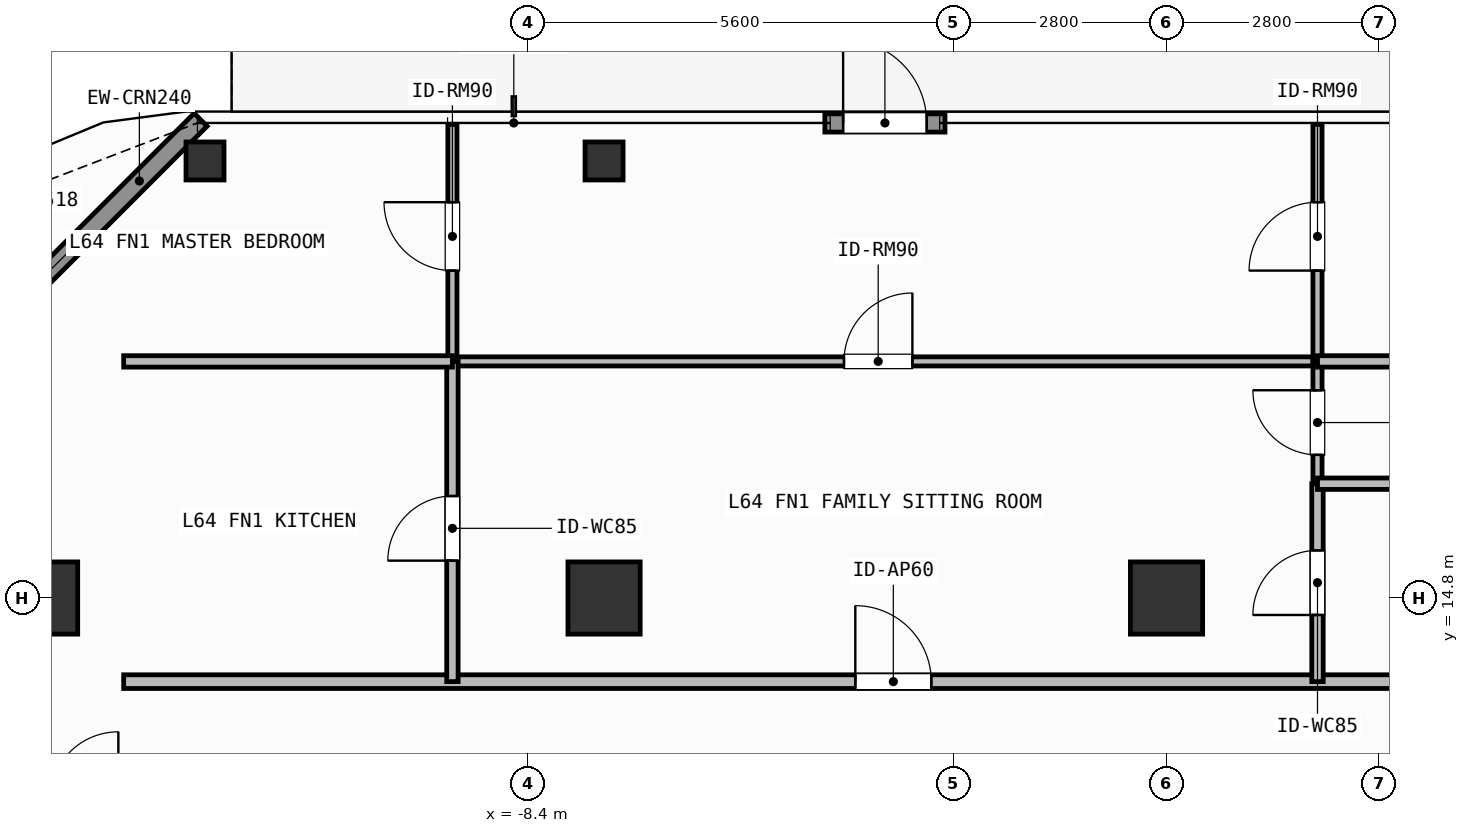
"""IFC4 building model, lengths in metres.
Left out: names, types, materials, properties, quantities, classifications, styles, units other than length and angle.
Written with IfcOpenShell. Run it as: python <this file> out.ifc"""

import sys

from ifc_helpers import new_model, si_unit, direction, frame, frame_2d, origin, origin_2d, place, context, subcontext, project, spatial, rectangle, hollow_rectangle, extrude, element, fill, save


model = new_model("IFC4")
c1 = context("Model", 3, precision=1e-05, world=origin(), true_north=direction((0.0, 1.0)))
c2 = subcontext(c1, "Body", "Model", "MODEL_VIEW")
j1 = project(units=[si_unit("LENGTHUNIT", "METRE"), si_unit("PLANEANGLEUNIT", "RADIAN")], contexts=[c1])
p1 = place(None, origin())
s1 = spatial("IfcSite", under=j1, at=p1, CompositionType="ELEMENT")
p2 = place(p1, origin())
s2 = spatial("IfcBuilding", under=s1, at=p2, CompositionType="ELEMENT")
p3 = place(p2, frame((0.0, 0.0, 262.5)))
s3 = spatial("IfcBuildingStorey", under=s2, at=p3, CompositionType="ELEMENT", Elevation=262.5)
for number, where, z_axis, x_axis in (
    (1, (-14.8, 14.8, 0.0), (0.0, 0.0, 1.0), (1.0, 0.0, 0.0)),
    (2, (-7.4, 14.8, 0.0), (0.0, 0.0, 1.0), (1.0, 0.0, 0.0)),
    (3, (0.0, 14.8, 0.0), (0.0, 0.0, 1.0), (1.0, 0.0, 0.0)),
):
    element("IfcColumn", number, at=place(p3, frame(where, z_axis=z_axis, x_axis=x_axis)), inside=s3, PredefinedType="COLUMN", context=c2, shape_type="SweptSolid", body=[
        extrude(rectangle(XDim=0.95, YDim=0.95, at=origin_2d()), origin(), (0.0, 0.0, 1.0), 3.9),
    ])
for number, where, z_axis, x_axis in (
    (4, (-12.65, 20.55, 0.0), (0.0, 0.0, 1.0), (1.0, 0.0, 0.0)),
    (5, (-7.4, 20.55, 0.0), (0.0, 0.0, 1.0), (1.0, 0.0, 0.0)),
):
    element("IfcColumn", number, at=place(p3, frame(where, z_axis=z_axis, x_axis=x_axis)), inside=s3, PredefinedType="COLUMN", context=c2, shape_type="SweptSolid", body=[
        extrude(hollow_rectangle(XDim=0.5, YDim=0.5, WallThickness=0.025, at=origin_2d()), origin(), (0.0, 0.0, 1.0), 3.9),
    ])
p4 = place(p3, frame((-4.495, 21.05, 0.0), z_axis=(0.0, 0.0, 1.0), x_axis=(1.0, 0.0, 0.0)))
e6 = element("IfcWall", 6, at=p4, inside=s3, PredefinedType="SOLIDWALL", context=c2, shape_type="SweptSolid", body=[
    extrude(rectangle(XDim=1.58, YDim=0.24, at=frame_2d((0.79, 0.0))), origin(), (0.0, 0.0, 1.0), 3.68),
])
p5 = place(p4, frame((0.24, 0.0, 0.0)))
e7 = element("IfcOpeningElement", 7, at=p5, cuts=e6, PredefinedType="OPENING", context=c2, shape_type="SweptSolid", body=[
    extrude(rectangle(XDim=1.1, YDim=2.2, at=frame_2d((0.55, 1.1))), frame((0.0, 0.13, 0.0), z_axis=(0.0, -1.0, 0.0), x_axis=(1.0, 0.0, 0.0)), (0.0, 0.0, 1.0), 0.26),
])
p6 = place(p3, frame((-16.992, 16.808, 0.0), z_axis=(0.0, 0.0, 1.0), x_axis=(0.707126925818, 0.707086635981, 0.0)))
e8 = element("IfcWall", 8, at=p6, inside=s3, PredefinedType="SOLIDWALL", context=c2, shape_type="SweptSolid", body=[
    extrude(rectangle(XDim=6.06, YDim=0.24, at=frame_2d((3.03, 0.0))), origin(), (0.0, 0.0, 1.0), 3.68),
])
p7 = place(p6, frame((2.28, 0.0, 0.8)))
e9 = element("IfcOpeningElement", 9, at=p7, cuts=e8, PredefinedType="OPENING", context=c2, shape_type="SweptSolid", body=[
    extrude(rectangle(XDim=1.5, YDim=1.85, at=frame_2d((0.75, 0.925))), frame((0.0, 0.13, 0.0), z_axis=(0.0, -1.0, 0.0), x_axis=(1.0, 0.0, 0.0)), (0.0, 0.0, 1.0), 0.26),
])
p8 = place(p3, frame((-13.72, 13.7, 0.0), z_axis=(0.0, 0.0, 1.0), x_axis=(1.0, 0.0, 0.0)))
e10 = element("IfcWall", 10, at=p8, inside=s3, PredefinedType="PARTITIONING", context=c2, shape_type="SweptSolid", body=[
    extrude(rectangle(XDim=21.144, YDim=0.18, at=frame_2d((10.572, 0.0))), origin(), (0.0, 0.0, 1.0), 3.68),
])
p9 = place(p8, frame((9.625, 0.0, 0.0)))
e11 = element("IfcOpeningElement", 11, at=p9, cuts=e10, PredefinedType="OPENING", context=c2, shape_type="SweptSolid", body=[
    extrude(rectangle(XDim=1.0, YDim=2.2, at=frame_2d((0.5, 1.1))), frame((0.0, 0.1, 0.0), z_axis=(0.0, -1.0, 0.0), x_axis=(1.0, 0.0, 0.0)), (0.0, 0.0, 1.0), 0.2),
])
p10 = place(p3, frame((-9.395, 17.913, 0.0), z_axis=(0.0, 0.0, 1.0), x_axis=(1.0, 0.0, 0.0)))
e12 = element("IfcWall", 12, at=p10, inside=s3, PredefinedType="PARTITIONING", context=c2, shape_type="SweptSolid", body=[
    extrude(rectangle(XDim=11.381, YDim=0.12, at=frame_2d((5.69, 0.0))), origin(), (0.0, 0.0, 1.0), 3.68),
])
p11 = place(p10, frame((5.151, 0.0, 0.0)))
e13 = element("IfcOpeningElement", 13, at=p11, cuts=e12, PredefinedType="OPENING", context=c2, shape_type="SweptSolid", body=[
    extrude(rectangle(XDim=0.9, YDim=2.1, at=frame_2d((0.45, 1.05))), frame((0.0, 0.07, 0.0), z_axis=(0.0, -1.0, 0.0), x_axis=(1.0, 0.0, 0.0)), (0.0, 0.0, 1.0), 0.14),
])
p12 = place(p3, frame((-9.395, 13.7, 0.0), z_axis=(0.0, 0.0, 1.0), x_axis=(0.0, 1.0, 0.0)))
e14 = element("IfcWall", 14, at=p12, inside=s3, PredefinedType="PARTITIONING", context=c2, shape_type="SweptSolid", body=[
    extrude(rectangle(XDim=4.213, YDim=0.15, at=frame_2d((2.106, 0.0))), origin(), (0.0, 0.0, 1.0), 3.68),
])
p13 = place(p12, frame((1.592, 0.0, 0.0)))
e15 = element("IfcOpeningElement", 15, at=p13, cuts=e14, PredefinedType="OPENING", context=c2, shape_type="SweptSolid", body=[
    extrude(rectangle(XDim=0.85, YDim=2.1, at=frame_2d((0.425, 1.05))), frame((0.0, 0.085, 0.0), z_axis=(0.0, -1.0, 0.0), x_axis=(1.0, 0.0, 0.0)), (0.0, 0.0, 1.0), 0.17),
])
p14 = place(p3, frame((-9.395, 17.913, 0.0), z_axis=(0.0, 0.0, 1.0), x_axis=(0.0, 1.0, 0.0)))
e16 = element("IfcWall", 16, at=p14, inside=s3, PredefinedType="PARTITIONING", context=c2, shape_type="SweptSolid", body=[
    extrude(rectangle(XDim=3.117, YDim=0.12, at=frame_2d((1.559, 0.0))), origin(), (0.0, 0.0, 1.0), 3.68),
])
p15 = place(p14, frame((1.195, 0.0, 0.0)))
e17 = element("IfcOpeningElement", 17, at=p15, cuts=e16, PredefinedType="OPENING", context=c2, shape_type="SweptSolid", body=[
    extrude(rectangle(XDim=0.9, YDim=2.1, at=frame_2d((0.45, 1.05))), frame((0.0, 0.07, 0.0), z_axis=(0.0, -1.0, 0.0), x_axis=(1.0, 0.0, 0.0)), (0.0, 0.0, 1.0), 0.14),
])
p16 = place(p3, frame((1.986, 13.7, 0.0), z_axis=(0.0, 0.0, 1.0), x_axis=(0.0, 1.0, 0.0)))
e18 = element("IfcWall", 18, at=p16, inside=s3, PredefinedType="PARTITIONING", context=c2, shape_type="SweptSolid", body=[
    extrude(rectangle(XDim=2.604, YDim=0.15, at=frame_2d((1.302, 0.0))), origin(), (0.0, 0.0, 1.0), 3.68),
])
p17 = place(p16, frame((0.877, 0.0, 0.0)))
e19 = element("IfcOpeningElement", 19, at=p17, cuts=e18, PredefinedType="OPENING", context=c2, shape_type="SweptSolid", body=[
    extrude(rectangle(XDim=0.85, YDim=2.1, at=frame_2d((0.425, 1.05))), frame((0.0, 0.085, 0.0), z_axis=(0.0, -1.0, 0.0), x_axis=(1.0, 0.0, 0.0)), (0.0, 0.0, 1.0), 0.17),
])
p18 = place(p3, frame((1.986, 16.304, 0.0), z_axis=(0.0, 0.0, 1.0), x_axis=(0.0, 1.0, 0.0)))
e20 = element("IfcWall", 20, at=p18, inside=s3, PredefinedType="PARTITIONING", context=c2, shape_type="SweptSolid", body=[
    extrude(rectangle(XDim=1.609, YDim=0.12, at=frame_2d((0.805, 0.0))), origin(), (0.0, 0.0, 1.0), 3.68),
])
p19 = place(p18, frame((0.379, 0.0, 0.0)))
e21 = element("IfcOpeningElement", 21, at=p19, cuts=e20, PredefinedType="OPENING", context=c2, shape_type="SweptSolid", body=[
    extrude(rectangle(XDim=0.85, YDim=2.1, at=frame_2d((0.425, 1.05))), frame((0.0, 0.07, 0.0), z_axis=(0.0, -1.0, 0.0), x_axis=(1.0, 0.0, 0.0)), (0.0, 0.0, 1.0), 0.14),
])
p20 = place(p3, frame((1.986, 17.913, 0.0), z_axis=(0.0, 0.0, 1.0), x_axis=(0.0, 1.0, 0.0)))
e22 = element("IfcWall", 22, at=p20, inside=s3, PredefinedType="PARTITIONING", context=c2, shape_type="SweptSolid", body=[
    extrude(rectangle(XDim=3.117, YDim=0.12, at=frame_2d((1.559, 0.0))), origin(), (0.0, 0.0, 1.0), 3.68),
])
p21 = place(p20, frame((1.195, 0.0, 0.0)))
e23 = element("IfcOpeningElement", 23, at=p21, cuts=e22, PredefinedType="OPENING", context=c2, shape_type="SweptSolid", body=[
    extrude(rectangle(XDim=0.9, YDim=2.1, at=frame_2d((0.45, 1.05))), frame((0.0, 0.07, 0.0), z_axis=(0.0, -1.0, 0.0), x_axis=(1.0, 0.0, 0.0)), (0.0, 0.0, 1.0), 0.14),
])
p22 = place(p3, frame((-13.72, 17.913, 0.0), z_axis=(0.0, 0.0, 1.0), x_axis=(1.0, 0.0, 0.0)))
e24 = element("IfcWall", 24, at=p22, inside=s3, PredefinedType="PARTITIONING", context=c2, shape_type="SweptSolid", body=[
    extrude(rectangle(XDim=4.325, YDim=0.15, at=frame_2d((2.163, 0.0))), origin(), (0.0, 0.0, 1.0), 3.68),
])
for number, where, z_axis, x_axis in (
    (25, (1.986, 16.304, 0.0), (0.0, 0.0, 1.0), (1.0, 0.0, 0.0)),
    (26, (1.986, 17.913, 0.0), (0.0, 0.0, 1.0), (1.0, 0.0, 0.0)),
):
    element("IfcWall", number, at=place(p3, frame(where, z_axis=z_axis, x_axis=x_axis)), inside=s3, PredefinedType="PARTITIONING", context=c2, shape_type="SweptSolid", body=[
        extrude(rectangle(XDim=5.438, YDim=0.15, at=frame_2d((2.719, 0.0))), origin(), (0.0, 0.0, 1.0), 3.68),
    ])
p23 = place(p5, origin())
e27 = element("IfcDoor", 27, at=p23, inside=s3, OperationType="SINGLE_SWING_LEFT", PredefinedType="DOOR", context=c2, shape_type="SweptSolid", body=[
    extrude(rectangle(XDim=1.1, YDim=2.2, at=frame_2d((0.55, 1.1))), frame((0.0, 0.025, 0.0), z_axis=(0.0, -1.0, 0.0), x_axis=(1.0, 0.0, 0.0)), (0.0, 0.0, 1.0), 0.05),
])
fill(e7, e27)
p24 = place(p7, origin())
e28 = element("IfcWindow", 28, at=p24, inside=s3, PartitioningType="SINGLE_PANEL", PredefinedType="WINDOW", context=c2, shape_type="SweptSolid", body=[
    extrude(rectangle(XDim=1.5, YDim=1.85, at=frame_2d((0.75, 0.925))), frame((0.0, 0.03, 0.0), z_axis=(0.0, -1.0, 0.0), x_axis=(1.0, 0.0, 0.0)), (0.0, 0.0, 1.0), 0.06),
])
fill(e9, e28)
p25 = place(p9, origin())
e29 = element("IfcDoor", 29, at=p25, inside=s3, OperationType="SINGLE_SWING_LEFT", PredefinedType="DOOR", context=c2, shape_type="SweptSolid", body=[
    extrude(rectangle(XDim=1.0, YDim=2.2, at=frame_2d((0.5, 1.1))), frame((0.0, 0.025, 0.0), z_axis=(0.0, -1.0, 0.0), x_axis=(1.0, 0.0, 0.0)), (0.0, 0.0, 1.0), 0.05),
])
fill(e11, e29)
p26 = place(p11, origin())
e30 = element("IfcDoor", 30, at=p26, inside=s3, OperationType="SINGLE_SWING_RIGHT", PredefinedType="DOOR", context=c2, shape_type="SweptSolid", body=[
    extrude(rectangle(XDim=0.9, YDim=2.1, at=frame_2d((0.45, 1.05))), frame((0.0, 0.025, 0.0), z_axis=(0.0, -1.0, 0.0), x_axis=(1.0, 0.0, 0.0)), (0.0, 0.0, 1.0), 0.05),
])
fill(e13, e30)
p27 = place(p13, origin())
e31 = element("IfcDoor", 31, at=p27, inside=s3, OperationType="SINGLE_SWING_LEFT", PredefinedType="DOOR", context=c2, shape_type="SweptSolid", body=[
    extrude(rectangle(XDim=0.85, YDim=2.1, at=frame_2d((0.425, 1.05))), frame((0.0, 0.025, 0.0), z_axis=(0.0, -1.0, 0.0), x_axis=(1.0, 0.0, 0.0)), (0.0, 0.0, 1.0), 0.05),
])
fill(e15, e31)
p28 = place(p15, origin())
e32 = element("IfcDoor", 32, at=p28, inside=s3, OperationType="SINGLE_SWING_RIGHT", PredefinedType="DOOR", context=c2, shape_type="SweptSolid", body=[
    extrude(rectangle(XDim=0.9, YDim=2.1, at=frame_2d((0.45, 1.05))), frame((0.0, 0.025, 0.0), z_axis=(0.0, -1.0, 0.0), x_axis=(1.0, 0.0, 0.0)), (0.0, 0.0, 1.0), 0.05),
])
fill(e17, e32)
p29 = place(p17, origin())
e33 = element("IfcDoor", 33, at=p29, inside=s3, OperationType="SINGLE_SWING_LEFT", PredefinedType="DOOR", context=c2, shape_type="SweptSolid", body=[
    extrude(rectangle(XDim=0.85, YDim=2.1, at=frame_2d((0.425, 1.05))), frame((0.0, 0.025, 0.0), z_axis=(0.0, -1.0, 0.0), x_axis=(1.0, 0.0, 0.0)), (0.0, 0.0, 1.0), 0.05),
])
fill(e19, e33)
p30 = place(p19, origin())
e34 = element("IfcDoor", 34, at=p30, inside=s3, OperationType="SINGLE_SWING_RIGHT", PredefinedType="DOOR", context=c2, shape_type="SweptSolid", body=[
    extrude(rectangle(XDim=0.85, YDim=2.1, at=frame_2d((0.425, 1.05))), frame((0.0, 0.025, 0.0), z_axis=(0.0, -1.0, 0.0), x_axis=(1.0, 0.0, 0.0)), (0.0, 0.0, 1.0), 0.05),
])
fill(e21, e34)
p31 = place(p21, origin())
e35 = element("IfcDoor", 35, at=p31, inside=s3, OperationType="SINGLE_SWING_LEFT", PredefinedType="DOOR", context=c2, shape_type="SweptSolid", body=[
    extrude(rectangle(XDim=0.9, YDim=2.1, at=frame_2d((0.45, 1.05))), frame((0.0, 0.025, 0.0), z_axis=(0.0, -1.0, 0.0), x_axis=(1.0, 0.0, 0.0)), (0.0, 0.0, 1.0), 0.05),
])
fill(e23, e35)
save(model, sys.argv[1])
